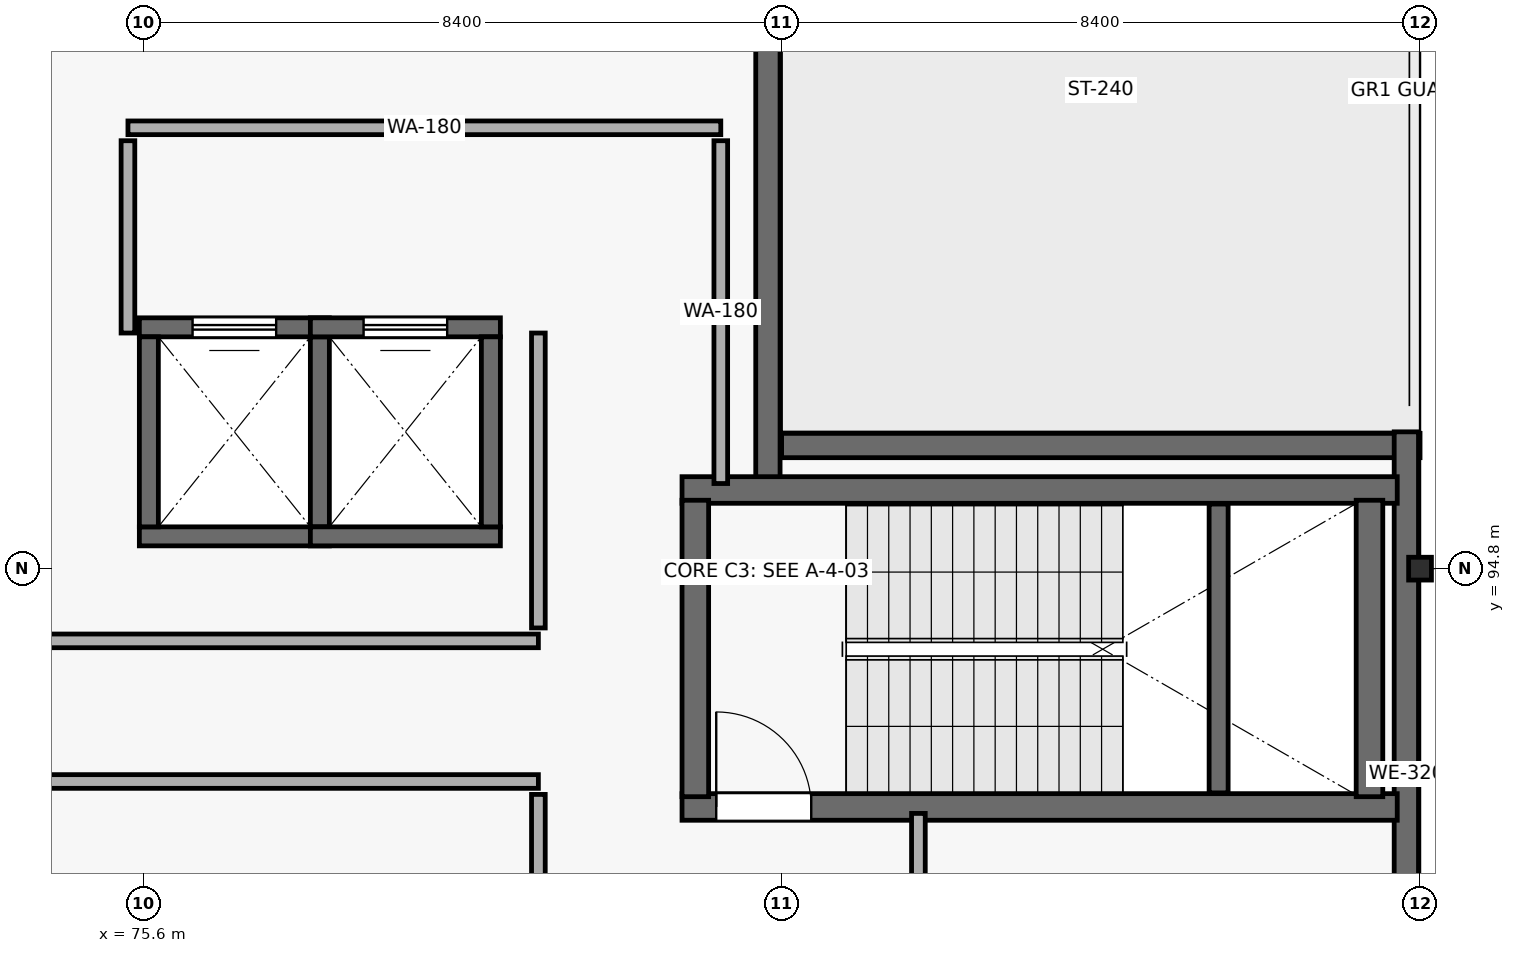
"""IFC4 building model, lengths in metres.
Left out: names, types, materials, properties, quantities, classifications, styles, units other than length and angle.
Written with IfcOpenShell. Run it as: python <this file> out.ifc"""

import sys

from ifc_helpers import new_model, si_unit, direction, frame, frame_2d, origin, origin_2d, place, context, subcontext, project, spatial, rectangle, hollow_rectangle, extrude, element, fill, save


model = new_model("IFC4")
c1 = context("Model", 3, precision=1e-05, world=origin(), true_north=direction((0.0, 1.0)))
c2 = subcontext(c1, "Body", "Model", "MODEL_VIEW")
j1 = project(units=[si_unit("LENGTHUNIT", "METRE"), si_unit("PLANEANGLEUNIT", "RADIAN")], contexts=[c1])
p1 = place(None, origin())
s1 = spatial("IfcSite", under=j1, at=p1, CompositionType="ELEMENT")
p2 = place(p1, origin())
s2 = spatial("IfcBuilding", under=s1, at=p2, CompositionType="ELEMENT")
p3 = place(p2, frame((0.0, 0.0, 30.6)))
s3 = spatial("IfcBuildingStorey", under=s2, at=p3, CompositionType="ELEMENT", Elevation=30.6)
p4 = place(p3, frame((92.4, 94.8, 0.0), z_axis=(0.0, 0.0, 1.0), x_axis=(1.0, 0.0, 0.0)))
e1 = element("IfcColumn", 1, at=p4, inside=s3, PredefinedType="COLUMN", context=c2, shape_type="SweptSolid", body=[
    extrude(hollow_rectangle(XDim=0.3, YDim=0.3, WallThickness=0.012, at=origin_2d()), origin(), (0.0, 0.0, 1.0), 5.1),
])
p5 = place(p3, frame((83.82, 110.4, 0.0), z_axis=(0.0, 0.0, 1.0), x_axis=(0.0, -1.0, 0.0)))
e2 = element("IfcWall", 2, at=p5, inside=s3, PredefinedType="SOLIDWALL", context=c2, shape_type="SweptSolid", body=[
    extrude(rectangle(XDim=14.43, YDim=0.32, at=frame_2d((7.215, 0.0))), origin(), (0.0, 0.0, 1.0), 4.84),
])
p6 = place(p5, frame((5.327, 0.0, 0.0)))
e3 = element("IfcOpeningElement", 3, at=p6, cuts=e2, PredefinedType="OPENING", context=c2, shape_type="SweptSolid", body=[
    extrude(rectangle(XDim=1.6, YDim=2.35, at=frame_2d((0.8, 1.175))), frame((0.0, 0.17, 0.0), z_axis=(0.0, -1.0, 0.0), x_axis=(1.0, 0.0, 0.0)), (0.0, 0.0, 1.0), 0.34),
])
p7 = place(p3, frame((84.0, 96.42, 0.0), z_axis=(0.0, 0.0, 1.0), x_axis=(1.0, 0.0, 0.0)))
e4 = element("IfcWall", 4, at=p7, inside=s3, PredefinedType="SOLIDWALL", context=c2, shape_type="SweptSolid", body=[
    extrude(rectangle(XDim=8.4, YDim=0.32, at=frame_2d((4.2, 0.0))), origin(), (0.0, 0.0, 1.0), 4.84),
])
p8 = place(p3, frame((92.22, 96.6, 0.0), z_axis=(0.0, 0.0, 1.0), x_axis=(0.0, -1.0, 0.0)))
e5 = element("IfcWall", 5, at=p8, inside=s3, PredefinedType="SOLIDWALL", context=c2, shape_type="SweptSolid", body=[
    extrude(rectangle(XDim=9.0, YDim=0.32, at=frame_2d((4.5, 0.0))), origin(), (0.0, 0.0, 1.0), 4.84),
])
p9 = place(p3, frame((82.69, 91.665, 0.0), z_axis=(0.0, 0.0, 1.0), x_axis=(1.0, 0.0, 0.0)))
e6 = element("IfcWall", 6, at=p9, inside=s3, PredefinedType="SHEAR", context=c2, shape_type="SweptSolid", body=[
    extrude(rectangle(XDim=9.41, YDim=0.35, at=frame_2d((4.705, 0.0))), origin(), (0.0, 0.0, 1.0), 4.84),
])
p10 = place(p9, frame((0.45, 0.0, 0.0)))
e7 = element("IfcOpeningElement", 7, at=p10, cuts=e6, PredefinedType="OPENING", context=c2, shape_type="SweptSolid", body=[
    extrude(rectangle(XDim=1.25, YDim=2.2, at=frame_2d((0.625, 1.1))), frame((0.0, 0.185, 0.0), z_axis=(0.0, -1.0, 0.0), x_axis=(1.0, 0.0, 0.0)), (0.0, 0.0, 1.0), 0.37),
])
p11 = place(p3, frame((92.1, 95.835, 0.0), z_axis=(0.0, 0.0, 1.0), x_axis=(-1.0, 0.0, 0.0)))
e8 = element("IfcWall", 8, at=p11, inside=s3, PredefinedType="SHEAR", context=c2, shape_type="SweptSolid", body=[
    extrude(rectangle(XDim=9.41, YDim=0.35, at=frame_2d((4.705, 0.0))), origin(), (0.0, 0.0, 1.0), 4.84),
])
for number, where, z_axis, x_axis in (
    (9, (82.865, 91.8, 0.0), (0.0, 0.0, 1.0), (0.0, 1.0, 0.0)),
    (10, (91.735, 95.7, 0.0), (0.0, 0.0, 1.0), (0.0, -1.0, 0.0)),
):
    element("IfcWall", number, at=place(p3, frame(where, z_axis=z_axis, x_axis=x_axis)), inside=s3, PredefinedType="SHEAR", context=c2, shape_type="SweptSolid", body=[
        extrude(rectangle(XDim=3.9, YDim=0.35, at=frame_2d((1.95, 0.0))), origin(), (0.0, 0.0, 1.0), 4.84),
    ])
p12 = place(p3, frame((89.75, 91.85, 0.0), z_axis=(0.0, 0.0, 1.0), x_axis=(0.0, 1.0, 0.0)))
e11 = element("IfcWall", 11, at=p12, inside=s3, PredefinedType="SHEAR", context=c2, shape_type="SweptSolid", body=[
    extrude(rectangle(XDim=3.8, YDim=0.25, at=frame_2d((1.9, 0.0))), origin(), (0.0, 0.0, 1.0), 2.37),
])
p13 = place(p3, frame((75.55, 95.225, 0.0), z_axis=(0.0, 0.0, 1.0), x_axis=(1.0, 0.0, 0.0)))
e12 = element("IfcWall", 12, at=p13, inside=s3, PredefinedType="SHEAR", context=c2, shape_type="SweptSolid", body=[
    extrude(rectangle(XDim=2.5, YDim=0.25, at=frame_2d((1.25, 0.0))), origin(), (0.0, 0.0, 1.0), 4.84),
])
p14 = place(p3, frame((78.05, 97.975, 0.0), z_axis=(0.0, 0.0, 1.0), x_axis=(-1.0, 0.0, 0.0)))
e13 = element("IfcWall", 13, at=p14, inside=s3, PredefinedType="SHEAR", context=c2, shape_type="SweptSolid", body=[
    extrude(rectangle(XDim=2.5, YDim=0.25, at=frame_2d((1.25, 0.0))), origin(), (0.0, 0.0, 1.0), 4.84),
])
p15 = place(p14, frame((0.7, 0.0, 0.0)))
e14 = element("IfcOpeningElement", 14, at=p15, cuts=e13, PredefinedType="OPENING", context=c2, shape_type="SweptSolid", body=[
    extrude(rectangle(XDim=1.1, YDim=2.2, at=frame_2d((0.55, 1.1))), frame((0.0, 0.135, 0.0), z_axis=(0.0, -1.0, 0.0), x_axis=(1.0, 0.0, 0.0)), (0.0, 0.0, 1.0), 0.27),
])
for number, where, z_axis, x_axis in (
    (15, (75.675, 95.35, 0.0), (0.0, 0.0, 1.0), (0.0, 1.0, 0.0)),
    (16, (77.925, 97.85, 0.0), (0.0, 0.0, 1.0), (0.0, -1.0, 0.0)),
    (17, (77.8, 95.225, 0.0), (0.0, 0.0, 1.0), (1.0, 0.0, 0.0)),
):
    element("IfcWall", number, at=place(p3, frame(where, z_axis=z_axis, x_axis=x_axis)), inside=s3, PredefinedType="SHEAR", context=c2, shape_type="SweptSolid", body=[
        extrude(rectangle(XDim=2.5, YDim=0.25, at=frame_2d((1.25, 0.0))), origin(), (0.0, 0.0, 1.0), 4.84),
    ])
p16 = place(p3, frame((80.3, 97.975, 0.0), z_axis=(0.0, 0.0, 1.0), x_axis=(-1.0, 0.0, 0.0)))
e18 = element("IfcWall", 18, at=p16, inside=s3, PredefinedType="SHEAR", context=c2, shape_type="SweptSolid", body=[
    extrude(rectangle(XDim=2.5, YDim=0.25, at=frame_2d((1.25, 0.0))), origin(), (0.0, 0.0, 1.0), 4.84),
])
p17 = place(p16, frame((0.7, 0.0, 0.0)))
e19 = element("IfcOpeningElement", 19, at=p17, cuts=e18, PredefinedType="OPENING", context=c2, shape_type="SweptSolid", body=[
    extrude(rectangle(XDim=1.1, YDim=2.2, at=frame_2d((0.55, 1.1))), frame((0.0, 0.135, 0.0), z_axis=(0.0, -1.0, 0.0), x_axis=(1.0, 0.0, 0.0)), (0.0, 0.0, 1.0), 0.27),
])
p18 = place(p3, frame((80.175, 97.85, 0.0), z_axis=(0.0, 0.0, 1.0), x_axis=(0.0, -1.0, 0.0)))
e20 = element("IfcWall", 20, at=p18, inside=s3, PredefinedType="SHEAR", context=c2, shape_type="SweptSolid", body=[
    extrude(rectangle(XDim=2.5, YDim=0.25, at=frame_2d((1.25, 0.0))), origin(), (0.0, 0.0, 1.0), 4.84),
])
p19 = place(p3, frame((63.265, 92.0, 0.0), z_axis=(0.0, 0.0, 1.0), x_axis=(1.0, 0.0, 0.0)))
e21 = element("IfcWall", 21, at=p19, inside=s3, PredefinedType="PARTITIONING", context=c2, shape_type="SweptSolid", body=[
    extrude(rectangle(XDim=17.535, YDim=0.18, at=frame_2d((8.768, 0.0))), origin(), (0.0, 0.0, 1.0), 4.84),
])
p20 = place(p19, frame((1.58, 0.0, 0.0)))
e22 = element("IfcOpeningElement", 22, at=p20, cuts=e21, PredefinedType="OPENING", context=c2, shape_type="SweptSolid", body=[
    extrude(rectangle(XDim=2.1, YDim=2.65, at=frame_2d((1.05, 1.325))), frame((0.0, 0.1, 0.0), z_axis=(0.0, -1.0, 0.0), x_axis=(1.0, 0.0, 0.0)), (0.0, 0.0, 1.0), 0.2),
])
p21 = place(p3, frame((80.8, 93.85, 0.0), z_axis=(0.0, 0.0, 1.0), x_axis=(-1.0, 0.0, 0.0)))
e23 = element("IfcWall", 23, at=p21, inside=s3, PredefinedType="PARTITIONING", context=c2, shape_type="SweptSolid", body=[
    extrude(rectangle(XDim=14.13, YDim=0.18, at=frame_2d((7.065, 0.0))), origin(), (0.0, 0.0, 1.0), 4.84),
])
p22 = place(p3, frame((83.2, 100.6, 0.0), z_axis=(0.0, 0.0, 1.0), x_axis=(-1.0, 0.0, 0.0)))
e24 = element("IfcWall", 24, at=p22, inside=s3, PredefinedType="PARTITIONING", context=c2, shape_type="SweptSolid", body=[
    extrude(rectangle(XDim=7.8, YDim=0.18, at=frame_2d((3.9, 0.0))), origin(), (0.0, 0.0, 1.0), 4.84),
])
p23 = place(p3, frame((83.2, 95.92, 0.0), z_axis=(0.0, 0.0, 1.0), x_axis=(0.0, 1.0, 0.0)))
e25 = element("IfcWall", 25, at=p23, inside=s3, PredefinedType="PARTITIONING", context=c2, shape_type="SweptSolid", body=[
    extrude(rectangle(XDim=4.51, YDim=0.18, at=frame_2d((2.255, 0.0))), origin(), (0.0, 0.0, 1.0), 4.84),
])
p24 = place(p3, frame((80.8, 97.9, 0.0), z_axis=(0.0, 0.0, 1.0), x_axis=(0.0, -1.0, 0.0)))
e26 = element("IfcWall", 26, at=p24, inside=s3, PredefinedType="PARTITIONING", context=c2, shape_type="SweptSolid", body=[
    extrude(rectangle(XDim=3.88, YDim=0.18, at=frame_2d((1.94, 0.0))), origin(), (0.0, 0.0, 1.0), 4.84),
])
p25 = place(p3, frame((80.8, 91.83, 0.0), z_axis=(0.0, 0.0, 1.0), x_axis=(0.0, -1.0, 0.0)))
e27 = element("IfcWall", 27, at=p25, inside=s3, PredefinedType="PARTITIONING", context=c2, shape_type="SweptSolid", body=[
    extrude(rectangle(XDim=2.46, YDim=0.18, at=frame_2d((1.23, 0.0))), origin(), (0.0, 0.0, 1.0), 4.84),
])
p26 = place(p3, frame((75.4, 100.43, 0.0), z_axis=(0.0, 0.0, 1.0), x_axis=(0.0, -1.0, 0.0)))
e28 = element("IfcWall", 28, at=p26, inside=s3, PredefinedType="PARTITIONING", context=c2, shape_type="SweptSolid", body=[
    extrude(rectangle(XDim=2.53, YDim=0.18, at=frame_2d((1.265, 0.0))), origin(), (0.0, 0.0, 1.0), 3.45),
])
p27 = place(p3, frame((85.8, 89.37, 0.0), z_axis=(0.0, 0.0, 1.0), x_axis=(0.0, 1.0, 0.0)))
e29 = element("IfcWall", 29, at=p27, inside=s3, PredefinedType="PARTITIONING", context=c2, shape_type="SweptSolid", body=[
    extrude(rectangle(XDim=2.21, YDim=0.18, at=frame_2d((1.105, 0.0))), origin(), (0.0, 0.0, 1.0), 4.84),
])
p28 = place(p10, origin())
e30 = element("IfcDoor", 30, at=p28, inside=s3, OperationType="SINGLE_SWING_LEFT", PredefinedType="DOOR", context=c2, shape_type="SweptSolid", body=[
    extrude(rectangle(XDim=1.25, YDim=2.2, at=frame_2d((0.625, 1.1))), frame((0.0, 0.025, 0.0), z_axis=(0.0, -1.0, 0.0), x_axis=(1.0, 0.0, 0.0)), (0.0, 0.0, 1.0), 0.05),
])
fill(e7, e30)
p29 = place(p15, origin())
e31 = element("IfcDoor", 31, at=p29, inside=s3, OperationType="SLIDING_TO_RIGHT", PredefinedType="DOOR", context=c2, shape_type="SweptSolid", body=[
    extrude(rectangle(XDim=1.1, YDim=2.2, at=frame_2d((0.55, 1.1))), frame((0.0, 0.025, 0.0), z_axis=(0.0, -1.0, 0.0), x_axis=(1.0, 0.0, 0.0)), (0.0, 0.0, 1.0), 0.05),
])
fill(e14, e31)
p30 = place(p17, origin())
e32 = element("IfcDoor", 32, at=p30, inside=s3, OperationType="SLIDING_TO_RIGHT", PredefinedType="DOOR", context=c2, shape_type="SweptSolid", body=[
    extrude(rectangle(XDim=1.1, YDim=2.2, at=frame_2d((0.55, 1.1))), frame((0.0, 0.025, 0.0), z_axis=(0.0, -1.0, 0.0), x_axis=(1.0, 0.0, 0.0)), (0.0, 0.0, 1.0), 0.05),
])
fill(e19, e32)
save(model, sys.argv[1])
